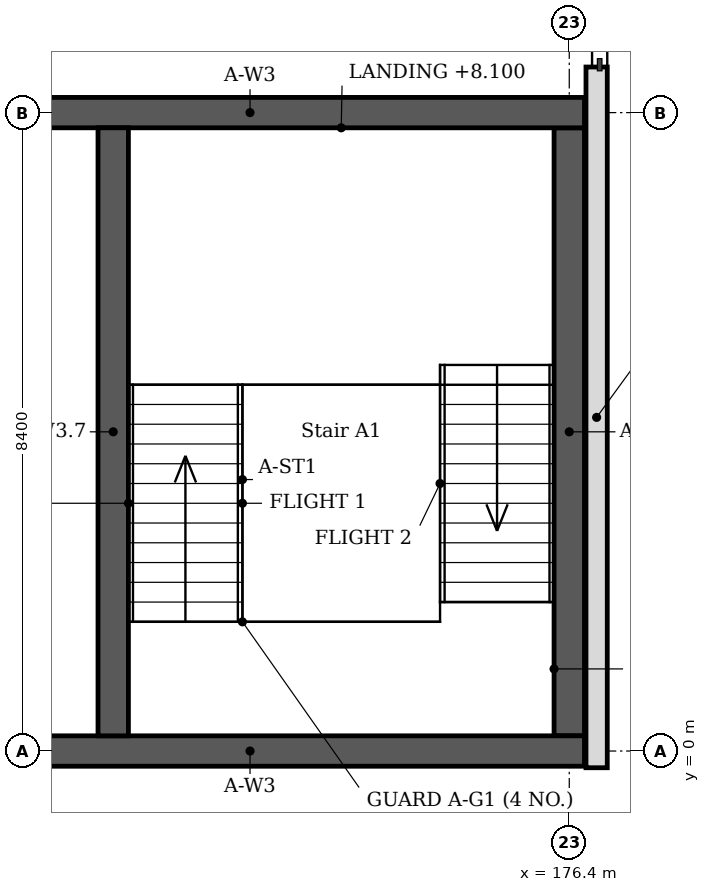
"""IFC4 building model, lengths in metres.
Left out: names, types, materials, properties, quantities, classifications, styles, units other than length and angle.
Written with IfcOpenShell. Run it as: python <this file> out.ifc"""

import sys

from ifc_helpers import new_model, si_unit, direction, frame, frame_2d, origin, place, context, subcontext, project, spatial, rectangle, extrude, element, save


model = new_model("IFC4")
c1 = context("Model", 3, precision=1e-05, world=origin(), true_north=direction((0.0, 1.0)))
c2 = subcontext(c1, "Body", "Model", "MODEL_VIEW")
j1 = project(units=[si_unit("LENGTHUNIT", "METRE"), si_unit("PLANEANGLEUNIT", "RADIAN")], contexts=[c1])
p1 = place(None, origin())
s1 = spatial("IfcSite", under=j1, at=p1, CompositionType="ELEMENT")
p2 = place(p1, origin())
s2 = spatial("IfcBuilding", under=s1, at=p2, CompositionType="ELEMENT")
p3 = place(p2, frame((0.0, 0.0, 6.0)))
s3 = spatial("IfcBuildingStorey", under=s2, at=p3, CompositionType="ELEMENT", Elevation=6.0)
for number, where, z_axis, x_axis in (
    (1, (167.8, 0.0, 0.0), (0.0, 0.0, 1.0), (1.0, 0.0, 0.0)),
    (2, (167.8, 8.4, 0.0), (0.0, 0.0, 1.0), (1.0, 0.0, 0.0)),
):
    element("IfcWall", number, at=place(p3, frame(where, z_axis=z_axis, x_axis=x_axis)), inside=s3, PredefinedType="SOLIDWALL", context=c2, shape_type="SweptSolid", body=[
        extrude(rectangle(XDim=8.8, YDim=0.4, at=frame_2d((4.4, 0.0))), origin(), (0.0, 0.0, 1.0), 4.05),
    ])
p4 = place(p3, frame((176.4, 0.2, 0.0), z_axis=(0.0, 0.0, 1.0), x_axis=(0.0, 1.0, 0.0)))
e3 = element("IfcWall", 3, at=p4, inside=s3, PredefinedType="SOLIDWALL", context=c2, shape_type="SweptSolid", body=[
    extrude(rectangle(XDim=8.0, YDim=0.4, at=frame_2d((4.0, 0.0))), origin(), (0.0, 0.0, 1.0), 4.05),
])
p5 = place(p2, origin())
s4 = spatial("IfcBuildingStorey", under=s2, at=p5, CompositionType="ELEMENT", Elevation=0.0)
p6 = place(p5, frame((176.76, -0.22, 0.0), z_axis=(0.0, 0.0, 1.0), x_axis=(0.0, 1.0, 0.0)))
e4 = element("IfcWall", 4, at=p6, inside=s4, PredefinedType="SOLIDWALL", context=c2, shape_type="SweptSolid", body=[
    extrude(rectangle(XDim=9.22, YDim=0.28, at=frame_2d((4.61, 0.0))), origin(), (0.0, 0.0, 1.0), 10.05),
])
p7 = place(p5, frame((170.4, 0.2, 0.0), z_axis=(0.0, 0.0, 1.0), x_axis=(0.0, 1.0, 0.0)))
e5 = element("IfcWall", 5, at=p7, inside=s4, PredefinedType="SOLIDWALL", context=c2, shape_type="SweptSolid", body=[
    extrude(rectangle(XDim=8.0, YDim=0.4, at=frame_2d((4.0, 0.0))), origin(), (0.0, 0.0, 1.0), 10.05),
])
p8 = place(p7, frame((0.3, 0.0, 0.0)))
e6 = element("IfcOpeningElement", 6, at=p8, cuts=e5, PredefinedType="OPENING", context=c2, shape_type="SweptSolid", body=[
    extrude(rectangle(XDim=0.9, YDim=2.1, at=frame_2d((0.45, 1.05))), frame((0.0, 0.21, 0.0), z_axis=(0.0, -1.0, 0.0), x_axis=(1.0, 0.0, 0.0)), (0.0, 0.0, 1.0), 0.42),
])
save(model, sys.argv[1])
